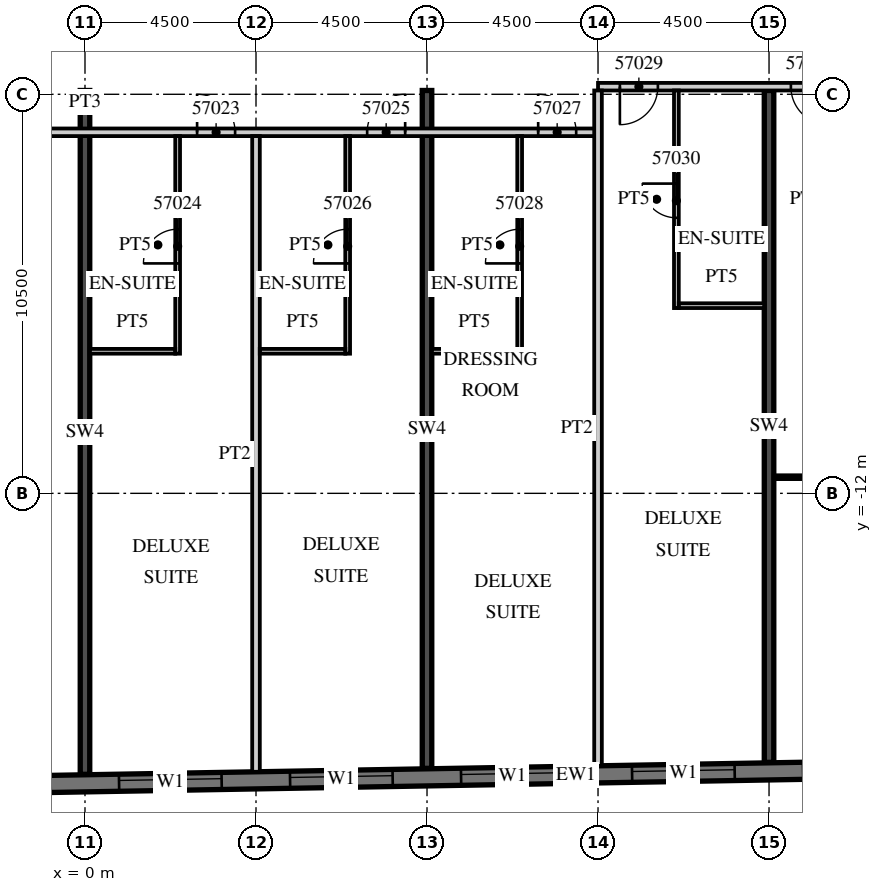
"""IFC4 building model, lengths in metres.
Left out: names, types, materials, properties, quantities, classifications, styles, units other than length and angle.
Written with IfcOpenShell. Run it as: python <this file> out.ifc"""

import sys

from ifc_helpers import new_model, si_unit, direction, frame, frame_2d, origin, place, context, subcontext, project, spatial, rectangle, extrude, element, fill, save


model = new_model("IFC4")
c1 = context("Model", 3, precision=1e-05, world=origin(), true_north=direction((0.0, 1.0)))
c2 = subcontext(c1, "Body", "Model", "MODEL_VIEW")
j1 = project(units=[si_unit("LENGTHUNIT", "METRE"), si_unit("PLANEANGLEUNIT", "RADIAN")], contexts=[c1])
p1 = place(None, origin())
s1 = spatial("IfcSite", under=j1, at=p1, CompositionType="ELEMENT")
p2 = place(p1, origin())
s2 = spatial("IfcBuilding", under=s1, at=p2, CompositionType="ELEMENT")
p3 = place(p2, frame((0.0, 0.0, 234.2)))
s3 = spatial("IfcBuildingStorey", under=s2, at=p3, CompositionType="ELEMENT", Elevation=234.2)
p4 = place(p3, frame((0.0, -19.393, 0.0), z_axis=(0.0, 0.0, 1.0), x_axis=(0.0, 1.0, 0.0)))
e1 = element("IfcWall", 1, at=p4, inside=s3, PredefinedType="SHEAR", context=c2, shape_type="SweptSolid", body=[
    extrude(rectangle(XDim=17.993, YDim=0.25, at=frame_2d((8.997, 0.0))), origin(), (0.0, 0.0, 1.0), 3.3),
])
p5 = place(p3, frame((9.0, -19.236, 0.0), z_axis=(0.0, 0.0, 1.0), x_axis=(0.0, 1.0, 0.0)))
e2 = element("IfcWall", 2, at=p5, inside=s3, PredefinedType="SHEAR", context=c2, shape_type="SweptSolid", body=[
    extrude(rectangle(XDim=17.836, YDim=0.25, at=frame_2d((8.918, 0.0))), origin(), (0.0, 0.0, 1.0), 3.3),
])
p6 = place(p3, frame((18.0, -19.079, 0.0), z_axis=(0.0, 0.0, 1.0), x_axis=(0.0, 1.0, 0.0)))
e3 = element("IfcWall", 3, at=p6, inside=s3, PredefinedType="SHEAR", context=c2, shape_type="SweptSolid", body=[
    extrude(rectangle(XDim=17.679, YDim=0.25, at=frame_2d((8.84, 0.0))), origin(), (0.0, 0.0, 1.0), 3.3),
])
p7 = place(p3, frame((-13.504, -19.866, 0.0), z_axis=(0.0, 0.0, 1.0), x_axis=(0.999847672978, 0.017453676992, 0.0)))
e4 = element("IfcWall", 4, at=p7, inside=s3, PredefinedType="SOLIDWALL", context=c2, shape_type="SweptSolid", body=[
    extrude(rectangle(XDim=52.86, YDim=0.45, at=frame_2d((26.43, 0.0))), origin(), (0.0, 0.0, 1.0), 3.02),
])
p8 = place(p7, frame((0.9, 0.0, 0.45)))
e5 = element("IfcOpeningElement", 5, at=p8, cuts=e4, PredefinedType="OPENING", context=c2, shape_type="SweptSolid", body=[
    extrude(rectangle(XDim=2.7, YDim=2.25, at=frame_2d((1.35, 1.125))), frame((0.0, 0.235, 0.0), z_axis=(0.0, -1.0, 0.0), x_axis=(1.0, 0.0, 0.0)), (0.0, 0.0, 1.0), 0.47),
])
p9 = place(p7, frame((5.401, 0.0, 0.45)))
e6 = element("IfcOpeningElement", 6, at=p9, cuts=e4, PredefinedType="OPENING", context=c2, shape_type="SweptSolid", body=[
    extrude(rectangle(XDim=2.7, YDim=2.25, at=frame_2d((1.35, 1.125))), frame((0.0, 0.235, 0.0), z_axis=(0.0, -1.0, 0.0), x_axis=(1.0, 0.0, 0.0)), (0.0, 0.0, 1.0), 0.47),
])
p10 = place(p7, frame((9.902, 0.0, 0.45)))
e7 = element("IfcOpeningElement", 7, at=p10, cuts=e4, PredefinedType="OPENING", context=c2, shape_type="SweptSolid", body=[
    extrude(rectangle(XDim=2.7, YDim=2.25, at=frame_2d((1.35, 1.125))), frame((0.0, 0.235, 0.0), z_axis=(0.0, -1.0, 0.0), x_axis=(1.0, 0.0, 0.0)), (0.0, 0.0, 1.0), 0.47),
])
p11 = place(p7, frame((14.402, 0.0, 0.45)))
e8 = element("IfcOpeningElement", 8, at=p11, cuts=e4, PredefinedType="OPENING", context=c2, shape_type="SweptSolid", body=[
    extrude(rectangle(XDim=2.7, YDim=2.25, at=frame_2d((1.35, 1.125))), frame((0.0, 0.235, 0.0), z_axis=(0.0, -1.0, 0.0), x_axis=(1.0, 0.0, 0.0)), (0.0, 0.0, 1.0), 0.47),
])
p12 = place(p7, frame((18.903, 0.0, 0.45)))
e9 = element("IfcOpeningElement", 9, at=p12, cuts=e4, PredefinedType="OPENING", context=c2, shape_type="SweptSolid", body=[
    extrude(rectangle(XDim=2.7, YDim=2.25, at=frame_2d((1.35, 1.125))), frame((0.0, 0.235, 0.0), z_axis=(0.0, -1.0, 0.0), x_axis=(1.0, 0.0, 0.0)), (0.0, 0.0, 1.0), 0.47),
])
p13 = place(p7, frame((23.404, 0.0, 0.45)))
e10 = element("IfcOpeningElement", 10, at=p13, cuts=e4, PredefinedType="OPENING", context=c2, shape_type="SweptSolid", body=[
    extrude(rectangle(XDim=2.7, YDim=2.25, at=frame_2d((1.35, 1.125))), frame((0.0, 0.235, 0.0), z_axis=(0.0, -1.0, 0.0), x_axis=(1.0, 0.0, 0.0)), (0.0, 0.0, 1.0), 0.47),
])
p14 = place(p7, frame((27.904, 0.0, 0.45)))
e11 = element("IfcOpeningElement", 11, at=p14, cuts=e4, PredefinedType="OPENING", context=c2, shape_type="SweptSolid", body=[
    extrude(rectangle(XDim=2.7, YDim=2.25, at=frame_2d((1.35, 1.125))), frame((0.0, 0.235, 0.0), z_axis=(0.0, -1.0, 0.0), x_axis=(1.0, 0.0, 0.0)), (0.0, 0.0, 1.0), 0.47),
])
p15 = place(p7, frame((32.405, 0.0, 0.45)))
e12 = element("IfcOpeningElement", 12, at=p15, cuts=e4, PredefinedType="OPENING", context=c2, shape_type="SweptSolid", body=[
    extrude(rectangle(XDim=2.7, YDim=2.25, at=frame_2d((1.35, 1.125))), frame((0.0, 0.235, 0.0), z_axis=(0.0, -1.0, 0.0), x_axis=(1.0, 0.0, 0.0)), (0.0, 0.0, 1.0), 0.47),
])
p16 = place(p7, frame((36.906, 0.0, 0.45)))
e13 = element("IfcOpeningElement", 13, at=p16, cuts=e4, PredefinedType="OPENING", context=c2, shape_type="SweptSolid", body=[
    extrude(rectangle(XDim=2.7, YDim=2.25, at=frame_2d((1.35, 1.125))), frame((0.0, 0.235, 0.0), z_axis=(0.0, -1.0, 0.0), x_axis=(1.0, 0.0, 0.0)), (0.0, 0.0, 1.0), 0.47),
])
p17 = place(p7, frame((41.406, 0.0, 0.45)))
e14 = element("IfcOpeningElement", 14, at=p17, cuts=e4, PredefinedType="OPENING", context=c2, shape_type="SweptSolid", body=[
    extrude(rectangle(XDim=2.7, YDim=2.25, at=frame_2d((1.35, 1.125))), frame((0.0, 0.235, 0.0), z_axis=(0.0, -1.0, 0.0), x_axis=(1.0, 0.0, 0.0)), (0.0, 0.0, 1.0), 0.47),
])
p18 = place(p7, frame((45.907, 0.0, 0.45)))
e15 = element("IfcOpeningElement", 15, at=p18, cuts=e4, PredefinedType="OPENING", context=c2, shape_type="SweptSolid", body=[
    extrude(rectangle(XDim=2.7, YDim=2.25, at=frame_2d((1.35, 1.125))), frame((0.0, 0.235, 0.0), z_axis=(0.0, -1.0, 0.0), x_axis=(1.0, 0.0, 0.0)), (0.0, 0.0, 1.0), 0.47),
])
p19 = place(p3, frame((-13.5, -2.5, 0.0), z_axis=(0.0, 0.0, 1.0), x_axis=(1.0, 0.0, 0.0)))
e16 = element("IfcWall", 16, at=p19, inside=s3, PredefinedType="PARTITIONING", context=c2, shape_type="SweptSolid", body=[
    extrude(rectangle(XDim=27.0, YDim=0.2, at=frame_2d((13.5, 0.0))), origin(), (0.0, 0.0, 1.0), 3.02),
])
p20 = place(p19, frame((2.925, 0.0, 0.0)))
e17 = element("IfcOpeningElement", 17, at=p20, cuts=e16, PredefinedType="OPENING", context=c2, shape_type="SweptSolid", body=[
    extrude(rectangle(XDim=1.0, YDim=2.1, at=frame_2d((0.5, 1.05))), frame((0.0, 0.11, 0.0), z_axis=(0.0, -1.0, 0.0), x_axis=(1.0, 0.0, 0.0)), (0.0, 0.0, 1.0), 0.22),
])
p21 = place(p19, frame((9.863, 0.0, 0.0)))
e18 = element("IfcOpeningElement", 18, at=p21, cuts=e16, PredefinedType="OPENING", context=c2, shape_type="SweptSolid", body=[
    extrude(rectangle(XDim=1.2, YDim=2.1, at=frame_2d((0.6, 1.05))), frame((0.0, 0.11, 0.0), z_axis=(0.0, -1.0, 0.0), x_axis=(1.0, 0.0, 0.0)), (0.0, 0.0, 1.0), 0.22),
])
p22 = place(p19, frame((16.45, 0.0, 0.0)))
e19 = element("IfcOpeningElement", 19, at=p22, cuts=e16, PredefinedType="OPENING", context=c2, shape_type="SweptSolid", body=[
    extrude(rectangle(XDim=1.0, YDim=2.1, at=frame_2d((0.5, 1.05))), frame((0.0, 0.11, 0.0), z_axis=(0.0, -1.0, 0.0), x_axis=(1.0, 0.0, 0.0)), (0.0, 0.0, 1.0), 0.22),
])
p23 = place(p19, frame((20.925, 0.0, 0.0)))
e20 = element("IfcOpeningElement", 20, at=p23, cuts=e16, PredefinedType="OPENING", context=c2, shape_type="SweptSolid", body=[
    extrude(rectangle(XDim=1.0, YDim=2.1, at=frame_2d((0.5, 1.05))), frame((0.0, 0.11, 0.0), z_axis=(0.0, -1.0, 0.0), x_axis=(1.0, 0.0, 0.0)), (0.0, 0.0, 1.0), 0.22),
])
p24 = place(p19, frame((25.425, 0.0, 0.0)))
e21 = element("IfcOpeningElement", 21, at=p24, cuts=e16, PredefinedType="OPENING", context=c2, shape_type="SweptSolid", body=[
    extrude(rectangle(XDim=1.0, YDim=2.1, at=frame_2d((0.5, 1.05))), frame((0.0, 0.11, 0.0), z_axis=(0.0, -1.0, 0.0), x_axis=(1.0, 0.0, 0.0)), (0.0, 0.0, 1.0), 0.22),
])
p25 = place(p3, frame((13.5, -1.3, 0.0), z_axis=(0.0, 0.0, 1.0), x_axis=(1.0, 0.0, 0.0)))
e22 = element("IfcWall", 22, at=p25, inside=s3, PredefinedType="PARTITIONING", context=c2, shape_type="SweptSolid", body=[
    extrude(rectangle(XDim=29.091, YDim=0.2, at=frame_2d((14.545, 0.0))), origin(), (0.0, 0.0, 1.0), 3.02),
])
p26 = place(p25, frame((0.575, 0.0, 0.0)))
e23 = element("IfcOpeningElement", 23, at=p26, cuts=e22, PredefinedType="OPENING", context=c2, shape_type="SweptSolid", body=[
    extrude(rectangle(XDim=1.0, YDim=2.1, at=frame_2d((0.5, 1.05))), frame((0.0, 0.11, 0.0), z_axis=(0.0, -1.0, 0.0), x_axis=(1.0, 0.0, 0.0)), (0.0, 0.0, 1.0), 0.22),
])
p27 = place(p25, frame((5.075, 0.0, 0.0)))
e24 = element("IfcOpeningElement", 24, at=p27, cuts=e22, PredefinedType="OPENING", context=c2, shape_type="SweptSolid", body=[
    extrude(rectangle(XDim=1.0, YDim=2.1, at=frame_2d((0.5, 1.05))), frame((0.0, 0.11, 0.0), z_axis=(0.0, -1.0, 0.0), x_axis=(1.0, 0.0, 0.0)), (0.0, 0.0, 1.0), 0.22),
])
p28 = place(p25, frame((9.55, 0.0, 0.0)))
e25 = element("IfcOpeningElement", 25, at=p28, cuts=e22, PredefinedType="OPENING", context=c2, shape_type="SweptSolid", body=[
    extrude(rectangle(XDim=1.0, YDim=2.1, at=frame_2d((0.5, 1.05))), frame((0.0, 0.11, 0.0), z_axis=(0.0, -1.0, 0.0), x_axis=(1.0, 0.0, 0.0)), (0.0, 0.0, 1.0), 0.22),
])
p29 = place(p25, frame((18.862, 0.0, 0.0)))
e26 = element("IfcOpeningElement", 26, at=p29, cuts=e22, PredefinedType="OPENING", context=c2, shape_type="SweptSolid", body=[
    extrude(rectangle(XDim=1.2, YDim=2.1, at=frame_2d((0.6, 1.05))), frame((0.0, 0.11, 0.0), z_axis=(0.0, -1.0, 0.0), x_axis=(1.0, 0.0, 0.0)), (0.0, 0.0, 1.0), 0.22),
])
p30 = place(p25, frame((23.075, 0.0, 0.0)))
e27 = element("IfcOpeningElement", 27, at=p30, cuts=e22, PredefinedType="OPENING", context=c2, shape_type="SweptSolid", body=[
    extrude(rectangle(XDim=1.0, YDim=2.1, at=frame_2d((0.5, 1.05))), frame((0.0, 0.11, 0.0), z_axis=(0.0, -1.0, 0.0), x_axis=(1.0, 0.0, 0.0)), (0.0, 0.0, 1.0), 0.22),
])
p31 = place(p25, frame((27.611, 0.0, 0.0)))
e28 = element("IfcOpeningElement", 28, at=p31, cuts=e22, PredefinedType="OPENING", context=c2, shape_type="SweptSolid", body=[
    extrude(rectangle(XDim=1.0, YDim=2.4, at=frame_2d((0.5, 1.2))), frame((0.0, 0.11, 0.0), z_axis=(0.0, -1.0, 0.0), x_axis=(1.0, 0.0, 0.0)), (0.0, 0.0, 1.0), 0.22),
])
p32 = place(p3, frame((4.5, -19.327, 0.0), z_axis=(0.0, 0.0, 1.0), x_axis=(0.0, 1.0, 0.0)))
e29 = element("IfcWall", 29, at=p32, inside=s3, PredefinedType="PARTITIONING", context=c2, shape_type="SweptSolid", body=[
    extrude(rectangle(XDim=16.727, YDim=0.2, at=frame_2d((8.363, 0.0))), origin(), (0.0, 0.0, 1.0), 3.02),
])
p33 = place(p3, frame((2.438, -8.325, 0.0), z_axis=(0.0, 0.0, 1.0), x_axis=(0.0, 1.0, 0.0)))
e30 = element("IfcWall", 30, at=p33, inside=s3, PredefinedType="PARTITIONING", context=c2, shape_type="SweptSolid", body=[
    extrude(rectangle(XDim=5.725, YDim=0.125, at=frame_2d((2.862, 0.0))), origin(), (0.0, 0.0, 1.0), 3.02),
])
p34 = place(p33, frame((2.375, 0.0, 0.0)))
e31 = element("IfcOpeningElement", 31, at=p34, cuts=e30, PredefinedType="OPENING", context=c2, shape_type="SweptSolid", body=[
    extrude(rectangle(XDim=0.9, YDim=2.1, at=frame_2d((0.45, 1.05))), frame((0.0, 0.073, 0.0), z_axis=(0.0, -1.0, 0.0), x_axis=(1.0, 0.0, 0.0)), (0.0, 0.0, 1.0), 0.145),
])
p35 = place(p3, frame((0.125, -8.262, 0.0), z_axis=(0.0, 0.0, 1.0), x_axis=(1.0, 0.0, 0.0)))
e32 = element("IfcWall", 32, at=p35, inside=s3, PredefinedType="PARTITIONING", context=c2, shape_type="SweptSolid", body=[
    extrude(rectangle(XDim=2.25, YDim=0.125, at=frame_2d((1.125, 0.0))), origin(), (0.0, 0.0, 1.0), 3.02),
])
p36 = place(p3, frame((6.912, -8.325, 0.0), z_axis=(0.0, 0.0, 1.0), x_axis=(0.0, 1.0, 0.0)))
e33 = element("IfcWall", 33, at=p36, inside=s3, PredefinedType="PARTITIONING", context=c2, shape_type="SweptSolid", body=[
    extrude(rectangle(XDim=5.725, YDim=0.125, at=frame_2d((2.862, 0.0))), origin(), (0.0, 0.0, 1.0), 3.02),
])
p37 = place(p36, frame((2.375, 0.0, 0.0)))
e34 = element("IfcOpeningElement", 34, at=p37, cuts=e33, PredefinedType="OPENING", context=c2, shape_type="SweptSolid", body=[
    extrude(rectangle(XDim=0.9, YDim=2.1, at=frame_2d((0.45, 1.05))), frame((0.0, 0.073, 0.0), z_axis=(0.0, -1.0, 0.0), x_axis=(1.0, 0.0, 0.0)), (0.0, 0.0, 1.0), 0.145),
])
p38 = place(p3, frame((4.6, -8.262, 0.0), z_axis=(0.0, 0.0, 1.0), x_axis=(1.0, 0.0, 0.0)))
e35 = element("IfcWall", 35, at=p38, inside=s3, PredefinedType="PARTITIONING", context=c2, shape_type="SweptSolid", body=[
    extrude(rectangle(XDim=2.25, YDim=0.125, at=frame_2d((1.125, 0.0))), origin(), (0.0, 0.0, 1.0), 3.02),
])
p39 = place(p3, frame((13.5, -19.17, 0.0), z_axis=(0.0, 0.0, 1.0), x_axis=(0.0, 1.0, 0.0)))
e36 = element("IfcWall", 36, at=p39, inside=s3, PredefinedType="PARTITIONING", context=c2, shape_type="SweptSolid", body=[
    extrude(rectangle(XDim=17.77, YDim=0.2, at=frame_2d((8.885, 0.0))), origin(), (0.0, 0.0, 1.0), 3.02),
])
p40 = place(p3, frame((11.438, -8.325, 0.0), z_axis=(0.0, 0.0, 1.0), x_axis=(0.0, 1.0, 0.0)))
e37 = element("IfcWall", 37, at=p40, inside=s3, PredefinedType="PARTITIONING", context=c2, shape_type="SweptSolid", body=[
    extrude(rectangle(XDim=5.725, YDim=0.125, at=frame_2d((2.862, 0.0))), origin(), (0.0, 0.0, 1.0), 3.02),
])
p41 = place(p40, frame((2.375, 0.0, 0.0)))
e38 = element("IfcOpeningElement", 38, at=p41, cuts=e37, PredefinedType="OPENING", context=c2, shape_type="SweptSolid", body=[
    extrude(rectangle(XDim=0.9, YDim=2.1, at=frame_2d((0.45, 1.05))), frame((0.0, 0.073, 0.0), z_axis=(0.0, -1.0, 0.0), x_axis=(1.0, 0.0, 0.0)), (0.0, 0.0, 1.0), 0.145),
])
p42 = place(p3, frame((9.125, -8.262, 0.0), z_axis=(0.0, 0.0, 1.0), x_axis=(1.0, 0.0, 0.0)))
e39 = element("IfcWall", 39, at=p42, inside=s3, PredefinedType="PARTITIONING", context=c2, shape_type="SweptSolid", body=[
    extrude(rectangle(XDim=2.25, YDim=0.125, at=frame_2d((1.125, 0.0))), origin(), (0.0, 0.0, 1.0), 3.02),
])
p43 = place(p3, frame((15.562, -7.125, 0.0), z_axis=(0.0, 0.0, 1.0), x_axis=(0.0, 1.0, 0.0)))
e40 = element("IfcWall", 40, at=p43, inside=s3, PredefinedType="PARTITIONING", context=c2, shape_type="SweptSolid", body=[
    extrude(rectangle(XDim=5.725, YDim=0.125, at=frame_2d((2.863, 0.0))), origin(), (0.0, 0.0, 1.0), 3.02),
])
p44 = place(p43, frame((2.375, 0.0, 0.0)))
e41 = element("IfcOpeningElement", 41, at=p44, cuts=e40, PredefinedType="OPENING", context=c2, shape_type="SweptSolid", body=[
    extrude(rectangle(XDim=0.9, YDim=2.1, at=frame_2d((0.45, 1.05))), frame((0.0, 0.073, 0.0), z_axis=(0.0, -1.0, 0.0), x_axis=(1.0, 0.0, 0.0)), (0.0, 0.0, 1.0), 0.145),
])
p45 = place(p3, frame((15.625, -7.062, 0.0), z_axis=(0.0, 0.0, 1.0), x_axis=(1.0, 0.0, 0.0)))
e42 = element("IfcWall", 42, at=p45, inside=s3, PredefinedType="PARTITIONING", context=c2, shape_type="SweptSolid", body=[
    extrude(rectangle(XDim=2.25, YDim=0.125, at=frame_2d((1.125, 0.0))), origin(), (0.0, 0.0, 1.0), 3.02),
])
p46 = place(p3, frame((18.125, -11.575, 0.0), z_axis=(0.0, 0.0, 1.0), x_axis=(1.0, 0.0, 0.0)))
e43 = element("IfcWall", 43, at=p46, inside=s3, PredefinedType="PARTITIONING", context=c2, shape_type="SweptSolid", body=[
    extrude(rectangle(XDim=4.275, YDim=0.1, at=frame_2d((2.137, 0.0))), origin(), (0.0, 0.0, 1.0), 3.02),
])
p47 = place(p46, frame((1.387, 0.0, 0.0)))
e44 = element("IfcOpeningElement", 44, at=p47, cuts=e43, PredefinedType="OPENING", context=c2, shape_type="SweptSolid", body=[
    extrude(rectangle(XDim=1.5, YDim=2.1, at=frame_2d((0.75, 1.05))), frame((0.0, 0.06, 0.0), z_axis=(0.0, -1.0, 0.0), x_axis=(1.0, 0.0, 0.0)), (0.0, 0.0, 1.0), 0.12),
])
p48 = place(p11, origin())
e45 = element("IfcWindow", 45, at=p48, inside=s3, PartitioningType="SINGLE_PANEL", PredefinedType="WINDOW", context=c2, shape_type="SweptSolid", body=[
    extrude(rectangle(XDim=2.7, YDim=2.25, at=frame_2d((1.35, 1.125))), frame((0.0, 0.09, 0.0), z_axis=(0.0, -1.0, 0.0), x_axis=(1.0, 0.0, 0.0)), (0.0, 0.0, 1.0), 0.06),
])
fill(e8, e45)
p49 = place(p12, origin())
e46 = element("IfcWindow", 46, at=p49, inside=s3, PartitioningType="SINGLE_PANEL", PredefinedType="WINDOW", context=c2, shape_type="SweptSolid", body=[
    extrude(rectangle(XDim=2.7, YDim=2.25, at=frame_2d((1.35, 1.125))), frame((0.0, 0.09, 0.0), z_axis=(0.0, -1.0, 0.0), x_axis=(1.0, 0.0, 0.0)), (0.0, 0.0, 1.0), 0.06),
])
fill(e9, e46)
p50 = place(p13, origin())
e47 = element("IfcWindow", 47, at=p50, inside=s3, PartitioningType="SINGLE_PANEL", PredefinedType="WINDOW", context=c2, shape_type="SweptSolid", body=[
    extrude(rectangle(XDim=2.7, YDim=2.25, at=frame_2d((1.35, 1.125))), frame((0.0, 0.09, 0.0), z_axis=(0.0, -1.0, 0.0), x_axis=(1.0, 0.0, 0.0)), (0.0, 0.0, 1.0), 0.06),
])
fill(e10, e47)
p51 = place(p14, origin())
e48 = element("IfcWindow", 48, at=p51, inside=s3, PartitioningType="SINGLE_PANEL", PredefinedType="WINDOW", context=c2, shape_type="SweptSolid", body=[
    extrude(rectangle(XDim=2.7, YDim=2.25, at=frame_2d((1.35, 1.125))), frame((0.0, 0.09, 0.0), z_axis=(0.0, -1.0, 0.0), x_axis=(1.0, 0.0, 0.0)), (0.0, 0.0, 1.0), 0.06),
])
fill(e11, e48)
p52 = place(p22, origin())
e49 = element("IfcDoor", 49, at=p52, inside=s3, OperationType="SINGLE_SWING_LEFT", PredefinedType="DOOR", context=c2, shape_type="SweptSolid", body=[
    extrude(rectangle(XDim=1.0, YDim=2.1, at=frame_2d((0.5, 1.05))), frame((0.0, 0.025, 0.0), z_axis=(0.0, -1.0, 0.0), x_axis=(1.0, 0.0, 0.0)), (0.0, 0.0, 1.0), 0.05),
])
fill(e19, e49)
p53 = place(p34, origin())
e50 = element("IfcDoor", 50, at=p53, inside=s3, OperationType="SINGLE_SWING_LEFT", PredefinedType="DOOR", context=c2, shape_type="SweptSolid", body=[
    extrude(rectangle(XDim=0.9, YDim=2.1, at=frame_2d((0.45, 1.05))), frame((0.0, 0.025, 0.0), z_axis=(0.0, -1.0, 0.0), x_axis=(1.0, 0.0, 0.0)), (0.0, 0.0, 1.0), 0.05),
])
fill(e31, e50)
p54 = place(p23, origin())
e51 = element("IfcDoor", 51, at=p54, inside=s3, OperationType="SINGLE_SWING_RIGHT", PredefinedType="DOOR", context=c2, shape_type="SweptSolid", body=[
    extrude(rectangle(XDim=1.0, YDim=2.1, at=frame_2d((0.5, 1.05))), frame((0.0, 0.025, 0.0), z_axis=(0.0, -1.0, 0.0), x_axis=(1.0, 0.0, 0.0)), (0.0, 0.0, 1.0), 0.05),
])
fill(e20, e51)
p55 = place(p37, origin())
e52 = element("IfcDoor", 52, at=p55, inside=s3, OperationType="SINGLE_SWING_LEFT", PredefinedType="DOOR", context=c2, shape_type="SweptSolid", body=[
    extrude(rectangle(XDim=0.9, YDim=2.1, at=frame_2d((0.45, 1.05))), frame((0.0, 0.025, 0.0), z_axis=(0.0, -1.0, 0.0), x_axis=(1.0, 0.0, 0.0)), (0.0, 0.0, 1.0), 0.05),
])
fill(e34, e52)
p56 = place(p24, origin())
e53 = element("IfcDoor", 53, at=p56, inside=s3, OperationType="SINGLE_SWING_LEFT", PredefinedType="DOOR", context=c2, shape_type="SweptSolid", body=[
    extrude(rectangle(XDim=1.0, YDim=2.1, at=frame_2d((0.5, 1.05))), frame((0.0, 0.025, 0.0), z_axis=(0.0, -1.0, 0.0), x_axis=(1.0, 0.0, 0.0)), (0.0, 0.0, 1.0), 0.05),
])
fill(e21, e53)
p57 = place(p41, origin())
e54 = element("IfcDoor", 54, at=p57, inside=s3, OperationType="SINGLE_SWING_LEFT", PredefinedType="DOOR", context=c2, shape_type="SweptSolid", body=[
    extrude(rectangle(XDim=0.9, YDim=2.1, at=frame_2d((0.45, 1.05))), frame((0.0, 0.025, 0.0), z_axis=(0.0, -1.0, 0.0), x_axis=(1.0, 0.0, 0.0)), (0.0, 0.0, 1.0), 0.05),
])
fill(e38, e54)
p58 = place(p26, origin())
e55 = element("IfcDoor", 55, at=p58, inside=s3, OperationType="SINGLE_SWING_LEFT", PredefinedType="DOOR", context=c2, shape_type="SweptSolid", body=[
    extrude(rectangle(XDim=1.0, YDim=2.1, at=frame_2d((0.5, 1.05))), frame((0.0, 0.025, 0.0), z_axis=(0.0, -1.0, 0.0), x_axis=(1.0, 0.0, 0.0)), (0.0, 0.0, 1.0), 0.05),
])
fill(e23, e55)
p59 = place(p44, origin())
e56 = element("IfcDoor", 56, at=p59, inside=s3, OperationType="SINGLE_SWING_RIGHT", PredefinedType="DOOR", context=c2, shape_type="SweptSolid", body=[
    extrude(rectangle(XDim=0.9, YDim=2.1, at=frame_2d((0.45, 1.05))), frame((0.0, 0.025, 0.0), z_axis=(0.0, -1.0, 0.0), x_axis=(1.0, 0.0, 0.0)), (0.0, 0.0, 1.0), 0.05),
])
fill(e41, e56)
p60 = place(p27, origin())
e57 = element("IfcDoor", 57, at=p60, inside=s3, OperationType="SINGLE_SWING_RIGHT", PredefinedType="DOOR", context=c2, shape_type="SweptSolid", body=[
    extrude(rectangle(XDim=1.0, YDim=2.1, at=frame_2d((0.5, 1.05))), frame((0.0, 0.025, 0.0), z_axis=(0.0, -1.0, 0.0), x_axis=(1.0, 0.0, 0.0)), (0.0, 0.0, 1.0), 0.05),
])
fill(e24, e57)
save(model, sys.argv[1])
